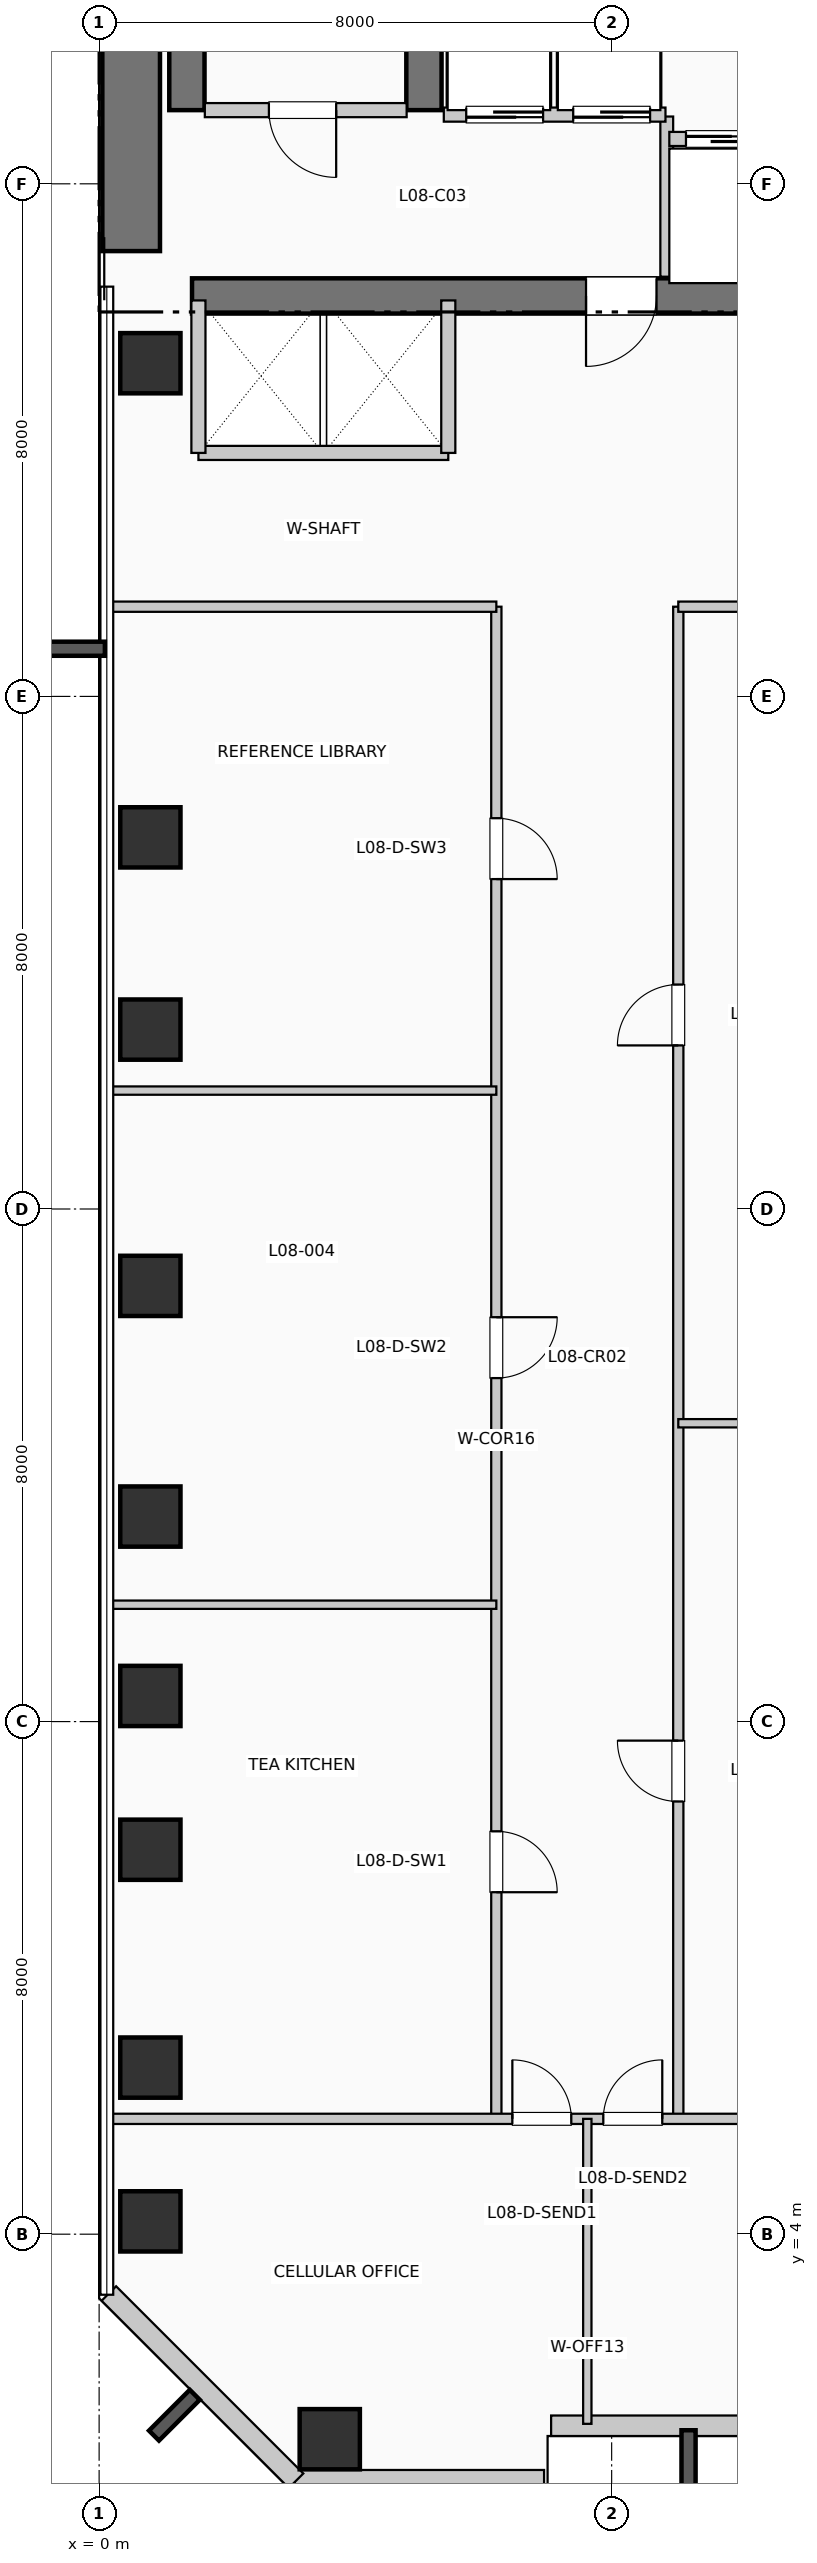
"""IFC4 building model, lengths in metres.
Left out: names, types, materials, properties, quantities, classifications, styles, units other than length and angle.
Written with IfcOpenShell. Run it as: python <this file> out.ifc"""

import sys

from ifc_helpers import new_model, si_unit, direction, frame, frame_2d, origin, origin_2d, place, context, subcontext, project, spatial, rectangle, extrude, element, fill, save


model = new_model("IFC4")
c1 = context("Model", 3, precision=1e-05, world=origin(), true_north=direction((0.0, 1.0)))
c2 = subcontext(c1, "Body", "Model", "MODEL_VIEW")
j1 = project(units=[si_unit("LENGTHUNIT", "METRE"), si_unit("PLANEANGLEUNIT", "RADIAN")], contexts=[c1])
p1 = place(None, origin())
s1 = spatial("IfcSite", under=j1, at=p1, CompositionType="ELEMENT")
p2 = place(p1, origin())
s2 = spatial("IfcBuilding", under=s1, at=p2, CompositionType="ELEMENT")
p3 = place(p2, frame((0.0, 0.0, 38.28)))
s3 = spatial("IfcBuildingStorey", under=s2, at=p3, CompositionType="ELEMENT", Elevation=38.28)
p4 = place(p3, frame((0.5, 34.95, 0.0), z_axis=(0.0, 0.0, 1.0), x_axis=(0.0, 1.0, 0.0)))
e1 = element("IfcWall", 1, at=p4, inside=s3, PredefinedType="SHEAR", context=c2, shape_type="SweptSolid", body=[
    extrude(rectangle(XDim=7.9, YDim=0.9, at=frame_2d((3.95, 0.0))), origin(), (0.0, 0.0, 1.0), 3.96),
])
p5 = place(p3, frame((1.45, 34.25, 0.0), z_axis=(0.0, 0.0, 1.0), x_axis=(1.0, 0.0, 0.0)))
e2 = element("IfcWall", 2, at=p5, inside=s3, PredefinedType="SHEAR", context=c2, shape_type="SweptSolid", body=[
    extrude(rectangle(XDim=10.71, YDim=0.55, at=frame_2d((5.355, 0.0))), origin(), (0.0, 0.0, 1.0), 3.96),
])
p6 = place(p5, frame((7.25, 0.0, 0.0), z_axis=(0.0, 0.0, 1.0), x_axis=(-1.0, 0.0, 0.0)))
e3 = element("IfcOpeningElement", 3, at=p6, cuts=e2, PredefinedType="OPENING", context=c2, shape_type="SweptSolid", body=[
    extrude(rectangle(XDim=1.1, YDim=2.15, at=frame_2d((0.55, 1.075))), frame((0.0, 0.285, 0.0), z_axis=(0.0, -1.0, 0.0), x_axis=(1.0, 0.0, 0.0)), (0.0, 0.0, 1.0), 0.57),
])
for number, where, z_axis, x_axis in (
    (4, (1.37, 37.15, 0.0), (0.0, 0.0, 1.0), (0.0, 1.0, 0.0)),
    (5, (5.07, 37.15, 0.0), (0.0, 0.0, 1.0), (0.0, 1.0, 0.0)),
):
    element("IfcWall", number, at=place(p3, frame(where, z_axis=z_axis, x_axis=x_axis)), inside=s3, PredefinedType="SHEAR", context=c2, shape_type="SweptSolid", body=[
        extrude(rectangle(XDim=7.89, YDim=0.55, at=frame_2d((3.945, 0.0))), origin(), (0.0, 0.0, 1.0), 3.96),
    ])
for number, where, z_axis, x_axis in (
    (6, (0.8, 4.2, 0.0), (0.0, 0.0, 1.0), (1.0, 0.0, 0.0)),
    (7, (0.8, 6.6, 0.0), (0.0, 0.0, 1.0), (1.0, 0.0, 0.0)),
    (8, (0.8, 10.0, 0.0), (0.0, 0.0, 1.0), (1.0, 0.0, 0.0)),
    (9, (0.8, 12.4, 0.0), (0.0, 0.0, 1.0), (1.0, 0.0, 0.0)),
    (10, (0.8, 15.2, 0.0), (0.0, 0.0, 1.0), (1.0, 0.0, 0.0)),
    (11, (0.8, 18.8, 0.0), (0.0, 0.0, 1.0), (1.0, 0.0, 0.0)),
    (12, (0.8, 22.8, 0.0), (0.0, 0.0, 1.0), (1.0, 0.0, 0.0)),
    (13, (0.8, 25.8, 0.0), (0.0, 0.0, 1.0), (1.0, 0.0, 0.0)),
    (14, (0.8, 33.2, 0.0), (0.0, 0.0, 1.0), (1.0, 0.0, 0.0)),
    (15, (3.6, 0.8, 0.0), (0.0, 0.0, 1.0), (1.0, 0.0, 0.0)),
):
    element("IfcColumn", number, at=place(p3, frame(where, z_axis=z_axis, x_axis=x_axis)), inside=s3, PredefinedType="COLUMN", context=c2, shape_type="SweptSolid", body=[
        extrude(rectangle(XDim=0.94, YDim=0.94, at=origin_2d()), origin(), (0.0, 0.0, 1.0), 3.96),
    ])
p7 = place(p3, frame((3.055, 0.16, 0.0), z_axis=(0.0, 0.0, 1.0), x_axis=(1.0, 0.0, 0.0)))
e16 = element("IfcWall", 16, at=p7, inside=s3, PredefinedType="SOLIDWALL", context=c2, shape_type="SweptSolid", body=[
    extrude(rectangle(XDim=3.89, YDim=0.32, at=frame_2d((1.945, 0.0))), origin(), (0.0, 0.0, 1.0), 3.71),
])
p8 = place(p3, frame((7.055, 1.01, 0.0), z_axis=(0.0, 0.0, 1.0), x_axis=(1.0, 0.0, 0.0)))
e17 = element("IfcWall", 17, at=p8, inside=s3, PredefinedType="SOLIDWALL", context=c2, shape_type="SweptSolid", body=[
    extrude(rectangle(XDim=9.89, YDim=0.32, at=frame_2d((4.945, 0.0))), origin(), (0.0, 0.0, 1.0), 3.71),
])
p9 = place(p8, frame((3.745, 0.0, 0.85)))
e18 = element("IfcOpeningElement", 18, at=p9, cuts=e17, PredefinedType="OPENING", context=c2, shape_type="SweptSolid", body=[
    extrude(rectangle(XDim=2.4, YDim=2.05, at=frame_2d((1.2, 1.025))), frame((0.0, 0.17, 0.0), z_axis=(0.0, -1.0, 0.0), x_axis=(1.0, 0.0, 0.0)), (0.0, 0.0, 1.0), 0.34),
])
p10 = place(p3, frame((0.152, 3.074, 0.0), z_axis=(0.0, 0.0, 1.0), x_axis=(0.707106781187, -0.707106781187, 0.0)))
e19 = element("IfcWall", 19, at=p10, inside=s3, PredefinedType="SOLIDWALL", context=c2, shape_type="SweptSolid", body=[
    extrude(rectangle(XDim=4.133, YDim=0.32, at=frame_2d((2.066, 0.0))), origin(), (0.0, 0.0, 1.0), 3.71),
])
p11 = place(p3, frame((1.65, 37.15, 0.0), z_axis=(0.0, 0.0, 1.0), x_axis=(1.0, 0.0, 0.0)))
e20 = element("IfcWall", 20, at=p11, inside=s3, PredefinedType="PARTITIONING", context=c2, shape_type="SweptSolid", body=[
    extrude(rectangle(XDim=3.15, YDim=0.22, at=frame_2d((1.575, 0.0))), origin(), (0.0, 0.0, 1.0), 3.71),
])
p12 = place(p11, frame((2.05, 0.0, 0.0), z_axis=(0.0, 0.0, 1.0), x_axis=(-1.0, 0.0, 0.0)))
e21 = element("IfcOpeningElement", 21, at=p12, cuts=e20, PredefinedType="OPENING", context=c2, shape_type="SweptSolid", body=[
    extrude(rectangle(XDim=1.05, YDim=2.15, at=frame_2d((0.525, 1.075))), frame((0.0, 0.12, 0.0), z_axis=(0.0, -1.0, 0.0), x_axis=(1.0, 0.0, 0.0)), (0.0, 0.0, 1.0), 0.24),
])
p13 = place(p3, frame((8.86, 34.55, 0.0), z_axis=(0.0, 0.0, 1.0), x_axis=(0.0, 1.0, 0.0)))
e22 = element("IfcWall", 22, at=p13, inside=s3, PredefinedType="PARTITIONING", context=c2, shape_type="SweptSolid", body=[
    extrude(rectangle(XDim=2.5, YDim=0.2, at=frame_2d((1.25, 0.0))), origin(), (0.0, 0.0, 1.0), 3.71),
])
p14 = place(p3, frame((5.38, 37.08, 0.0), z_axis=(0.0, 0.0, 1.0), x_axis=(1.0, 0.0, 0.0)))
e23 = element("IfcWall", 23, at=p14, inside=s3, PredefinedType="PARTITIONING", context=c2, shape_type="SweptSolid", body=[
    extrude(rectangle(XDim=3.46, YDim=0.22, at=frame_2d((1.73, 0.0))), origin(), (0.0, 0.0, 1.0), 3.71),
])
p15 = place(p14, frame((1.55, 0.0, 0.0), z_axis=(0.0, 0.0, 1.0), x_axis=(-1.0, 0.0, 0.0)))
e24 = element("IfcOpeningElement", 24, at=p15, cuts=e23, PredefinedType="OPENING", context=c2, shape_type="SweptSolid", body=[
    extrude(rectangle(XDim=1.2, YDim=2.2, at=frame_2d((0.6, 1.1))), frame((0.0, 0.12, 0.0), z_axis=(0.0, -1.0, 0.0), x_axis=(1.0, 0.0, 0.0)), (0.0, 0.0, 1.0), 0.24),
])
p16 = place(p14, frame((3.22, 0.0, 0.0), z_axis=(0.0, 0.0, 1.0), x_axis=(-1.0, 0.0, 0.0)))
e25 = element("IfcOpeningElement", 25, at=p16, cuts=e23, PredefinedType="OPENING", context=c2, shape_type="SweptSolid", body=[
    extrude(rectangle(XDim=1.2, YDim=2.2, at=frame_2d((0.6, 1.1))), frame((0.0, 0.12, 0.0), z_axis=(0.0, -1.0, 0.0), x_axis=(1.0, 0.0, 0.0)), (0.0, 0.0, 1.0), 0.24),
])
p17 = place(p3, frame((1.55, 31.8, 0.0), z_axis=(0.0, 0.0, 1.0), x_axis=(1.0, 0.0, 0.0)))
e26 = element("IfcWall", 26, at=p17, inside=s3, PredefinedType="PARTITIONING", context=c2, shape_type="SweptSolid", body=[
    extrude(rectangle(XDim=3.9, YDim=0.22, at=frame_2d((1.95, 0.0))), origin(), (0.0, 0.0, 1.0), 3.71),
])
for number, where, z_axis, x_axis in (
    (27, (1.55, 31.8, 0.0), (0.0, 0.0, 1.0), (0.0, 1.0, 0.0)),
    (28, (5.45, 31.8, 0.0), (0.0, 0.0, 1.0), (0.0, 1.0, 0.0)),
):
    element("IfcWall", number, at=place(p3, frame(where, z_axis=z_axis, x_axis=x_axis)), inside=s3, PredefinedType="PARTITIONING", context=c2, shape_type="SweptSolid", body=[
        extrude(rectangle(XDim=2.38, YDim=0.22, at=frame_2d((1.19, 0.0))), origin(), (0.0, 0.0, 1.0), 3.71),
    ])
p18 = place(p3, frame((8.9, 36.7, 0.0), z_axis=(0.0, 0.0, 1.0), x_axis=(1.0, 0.0, 0.0)))
e29 = element("IfcWall", 29, at=p18, inside=s3, PredefinedType="PARTITIONING", context=c2, shape_type="SweptSolid", body=[
    extrude(rectangle(XDim=3.26, YDim=0.22, at=frame_2d((1.63, 0.0))), origin(), (0.0, 0.0, 1.0), 3.71),
])
p19 = place(p18, frame((0.26, 0.0, 0.0)))
e30 = element("IfcOpeningElement", 30, at=p19, cuts=e29, PredefinedType="OPENING", context=c2, shape_type="SweptSolid", body=[
    extrude(rectangle(XDim=1.1, YDim=2.2, at=frame_2d((0.55, 1.1))), frame((0.0, 0.12, 0.0), z_axis=(0.0, -1.0, 0.0), x_axis=(1.0, 0.0, 0.0)), (0.0, 0.0, 1.0), 0.24),
])
p20 = place(p18, frame((1.88, 0.0, 0.0)))
e31 = element("IfcOpeningElement", 31, at=p20, cuts=e29, PredefinedType="OPENING", context=c2, shape_type="SweptSolid", body=[
    extrude(rectangle(XDim=1.1, YDim=2.2, at=frame_2d((0.55, 1.1))), frame((0.0, 0.12, 0.0), z_axis=(0.0, -1.0, 0.0), x_axis=(1.0, 0.0, 0.0)), (0.0, 0.0, 1.0), 0.24),
])
p21 = place(p3, frame((6.2, 5.8, 0.0), z_axis=(0.0, 0.0, 1.0), x_axis=(0.0, 1.0, 0.0)))
e32 = element("IfcWall", 32, at=p21, inside=s3, PredefinedType="PARTITIONING", context=c2, shape_type="SweptSolid", body=[
    extrude(rectangle(XDim=23.6, YDim=0.16, at=frame_2d((11.8, 0.0))), origin(), (0.0, 0.0, 1.0), 3.71),
])
p22 = place(p21, frame((4.487, 0.0, 0.0), z_axis=(0.0, 0.0, 1.0), x_axis=(-1.0, 0.0, 0.0)))
e33 = element("IfcOpeningElement", 33, at=p22, cuts=e32, PredefinedType="OPENING", context=c2, shape_type="SweptSolid", body=[
    extrude(rectangle(XDim=0.95, YDim=2.15, at=frame_2d((0.475, 1.075))), frame((0.0, 0.09, 0.0), z_axis=(0.0, -1.0, 0.0), x_axis=(1.0, 0.0, 0.0)), (0.0, 0.0, 1.0), 0.18),
])
p23 = place(p21, frame((12.511, 0.0, 0.0), z_axis=(0.0, 0.0, 1.0), x_axis=(-1.0, 0.0, 0.0)))
e34 = element("IfcOpeningElement", 34, at=p23, cuts=e32, PredefinedType="OPENING", context=c2, shape_type="SweptSolid", body=[
    extrude(rectangle(XDim=0.95, YDim=2.15, at=frame_2d((0.475, 1.075))), frame((0.0, 0.09, 0.0), z_axis=(0.0, -1.0, 0.0), x_axis=(1.0, 0.0, 0.0)), (0.0, 0.0, 1.0), 0.18),
])
p24 = place(p21, frame((20.299, 0.0, 0.0), z_axis=(0.0, 0.0, 1.0), x_axis=(-1.0, 0.0, 0.0)))
e35 = element("IfcOpeningElement", 35, at=p24, cuts=e32, PredefinedType="OPENING", context=c2, shape_type="SweptSolid", body=[
    extrude(rectangle(XDim=0.95, YDim=2.15, at=frame_2d((0.475, 1.075))), frame((0.0, 0.09, 0.0), z_axis=(0.0, -1.0, 0.0), x_axis=(1.0, 0.0, 0.0)), (0.0, 0.0, 1.0), 0.18),
])
p25 = place(p3, frame((9.04, 5.8, 0.0), z_axis=(0.0, 0.0, 1.0), x_axis=(0.0, 1.0, 0.0)))
e36 = element("IfcWall", 36, at=p25, inside=s3, PredefinedType="PARTITIONING", context=c2, shape_type="SweptSolid", body=[
    extrude(rectangle(XDim=23.6, YDim=0.16, at=frame_2d((11.8, 0.0))), origin(), (0.0, 0.0, 1.0), 3.71),
])
p26 = place(p25, frame((4.953, 0.0, 0.0)))
e37 = element("IfcOpeningElement", 37, at=p26, cuts=e36, PredefinedType="OPENING", context=c2, shape_type="SweptSolid", body=[
    extrude(rectangle(XDim=0.95, YDim=2.15, at=frame_2d((0.475, 1.075))), frame((0.0, 0.09, 0.0), z_axis=(0.0, -1.0, 0.0), x_axis=(1.0, 0.0, 0.0)), (0.0, 0.0, 1.0), 0.18),
])
p27 = place(p25, frame((16.753, 0.0, 0.0)))
e38 = element("IfcOpeningElement", 38, at=p27, cuts=e36, PredefinedType="OPENING", context=c2, shape_type="SweptSolid", body=[
    extrude(rectangle(XDim=0.95, YDim=2.15, at=frame_2d((0.475, 1.075))), frame((0.0, 0.09, 0.0), z_axis=(0.0, -1.0, 0.0), x_axis=(1.0, 0.0, 0.0)), (0.0, 0.0, 1.0), 0.18),
])
p28 = place(p3, frame((0.19, 5.8, 0.0), z_axis=(0.0, 0.0, 1.0), x_axis=(1.0, 0.0, 0.0)))
e39 = element("IfcWall", 39, at=p28, inside=s3, PredefinedType="PARTITIONING", context=c2, shape_type="SweptSolid", body=[
    extrude(rectangle(XDim=23.26, YDim=0.16, at=frame_2d((11.63, 0.0))), origin(), (0.0, 0.0, 1.0), 3.71),
])
p29 = place(p28, frame((6.26, 0.0, 0.0)))
e40 = element("IfcOpeningElement", 40, at=p29, cuts=e39, PredefinedType="OPENING", context=c2, shape_type="SweptSolid", body=[
    extrude(rectangle(XDim=0.92, YDim=2.1, at=frame_2d((0.46, 1.05))), frame((0.0, 0.09, 0.0), z_axis=(0.0, -1.0, 0.0), x_axis=(1.0, 0.0, 0.0)), (0.0, 0.0, 1.0), 0.18),
])
p30 = place(p28, frame((7.68, 0.0, 0.0)))
e41 = element("IfcOpeningElement", 41, at=p30, cuts=e39, PredefinedType="OPENING", context=c2, shape_type="SweptSolid", body=[
    extrude(rectangle(XDim=0.92, YDim=2.1, at=frame_2d((0.46, 1.05))), frame((0.0, 0.09, 0.0), z_axis=(0.0, -1.0, 0.0), x_axis=(1.0, 0.0, 0.0)), (0.0, 0.0, 1.0), 0.18),
])
p31 = place(p3, frame((0.19, 29.4, 0.0), z_axis=(0.0, 0.0, 1.0), x_axis=(1.0, 0.0, 0.0)))
e42 = element("IfcWall", 42, at=p31, inside=s3, PredefinedType="PARTITIONING", context=c2, shape_type="SweptSolid", body=[
    extrude(rectangle(XDim=6.01, YDim=0.16, at=frame_2d((3.005, 0.0))), origin(), (0.0, 0.0, 1.0), 3.365),
])
p32 = place(p3, frame((9.04, 29.4, 0.0), z_axis=(0.0, 0.0, 1.0), x_axis=(1.0, 0.0, 0.0)))
e43 = element("IfcWall", 43, at=p32, inside=s3, PredefinedType="PARTITIONING", context=c2, shape_type="SweptSolid", body=[
    extrude(rectangle(XDim=14.41, YDim=0.16, at=frame_2d((7.205, 0.0))), origin(), (0.0, 0.0, 1.0), 3.365),
])
p33 = place(p3, frame((7.62, 1.04, 0.0), z_axis=(0.0, 0.0, 1.0), x_axis=(0.0, 1.0, 0.0)))
e44 = element("IfcWall", 44, at=p33, inside=s3, PredefinedType="PARTITIONING", context=c2, shape_type="SweptSolid", body=[
    extrude(rectangle(XDim=4.76, YDim=0.13, at=frame_2d((2.38, 0.0))), origin(), (0.0, 0.0, 1.0), 3.71),
])
for number, where, z_axis, x_axis in (
    (45, (0.19, 13.824, 0.0), (0.0, 0.0, 1.0), (1.0, 0.0, 0.0)),
    (46, (0.19, 21.848, 0.0), (0.0, 0.0, 1.0), (1.0, 0.0, 0.0)),
):
    element("IfcWall", number, at=place(p3, frame(where, z_axis=z_axis, x_axis=x_axis)), inside=s3, PredefinedType="PARTITIONING", context=c2, shape_type="SweptSolid", body=[
        extrude(rectangle(XDim=6.01, YDim=0.13, at=frame_2d((3.005, 0.0))), origin(), (0.0, 0.0, 1.0), 3.71),
    ])
p34 = place(p3, frame((9.04, 16.656, 0.0), z_axis=(0.0, 0.0, 1.0), x_axis=(1.0, 0.0, 0.0)))
e47 = element("IfcWall", 47, at=p34, inside=s3, PredefinedType="PARTITIONING", context=c2, shape_type="SweptSolid", body=[
    extrude(rectangle(XDim=14.41, YDim=0.13, at=frame_2d((7.205, 0.0))), origin(), (0.0, 0.0, 1.0), 3.71),
])
p35 = place(p12, origin())
e48 = element("IfcDoor", 48, at=p35, inside=s3, OperationType="SINGLE_SWING_RIGHT", PredefinedType="DOOR", context=c2, shape_type="SweptSolid", body=[
    extrude(rectangle(XDim=1.05, YDim=2.15, at=frame_2d((0.525, 1.075))), frame((0.0, 0.025, 0.0), z_axis=(0.0, -1.0, 0.0), x_axis=(1.0, 0.0, 0.0)), (0.0, 0.0, 1.0), 0.05),
])
fill(e21, e48)
p36 = place(p6, origin())
e49 = element("IfcDoor", 49, at=p36, inside=s3, OperationType="SINGLE_SWING_LEFT", PredefinedType="DOOR", context=c2, shape_type="SweptSolid", body=[
    extrude(rectangle(XDim=1.1, YDim=2.15, at=frame_2d((0.55, 1.075))), frame((0.0, 0.025, 0.0), z_axis=(0.0, -1.0, 0.0), x_axis=(1.0, 0.0, 0.0)), (0.0, 0.0, 1.0), 0.05),
])
fill(e3, e49)
p37 = place(p15, origin())
e50 = element("IfcDoor", 50, at=p37, inside=s3, OperationType="SLIDING_TO_RIGHT", PredefinedType="DOOR", context=c2, shape_type="SweptSolid", body=[
    extrude(rectangle(XDim=1.2, YDim=2.2, at=frame_2d((0.6, 1.1))), frame((0.0, 0.025, 0.0), z_axis=(0.0, -1.0, 0.0), x_axis=(1.0, 0.0, 0.0)), (0.0, 0.0, 1.0), 0.05),
])
fill(e24, e50)
p38 = place(p16, origin())
e51 = element("IfcDoor", 51, at=p38, inside=s3, OperationType="SLIDING_TO_RIGHT", PredefinedType="DOOR", context=c2, shape_type="SweptSolid", body=[
    extrude(rectangle(XDim=1.2, YDim=2.2, at=frame_2d((0.6, 1.1))), frame((0.0, 0.025, 0.0), z_axis=(0.0, -1.0, 0.0), x_axis=(1.0, 0.0, 0.0)), (0.0, 0.0, 1.0), 0.05),
])
fill(e25, e51)
p39 = place(p19, origin())
e52 = element("IfcDoor", 52, at=p39, inside=s3, OperationType="SLIDING_TO_LEFT", PredefinedType="DOOR", context=c2, shape_type="SweptSolid", body=[
    extrude(rectangle(XDim=1.1, YDim=2.2, at=frame_2d((0.55, 1.1))), frame((0.0, 0.025, 0.0), z_axis=(0.0, -1.0, 0.0), x_axis=(1.0, 0.0, 0.0)), (0.0, 0.0, 1.0), 0.05),
])
fill(e30, e52)
p40 = place(p29, origin())
e53 = element("IfcDoor", 53, at=p40, inside=s3, OperationType="SINGLE_SWING_LEFT", PredefinedType="DOOR", context=c2, shape_type="SweptSolid", body=[
    extrude(rectangle(XDim=0.92, YDim=2.1, at=frame_2d((0.46, 1.05))), frame((0.0, 0.025, 0.0), z_axis=(0.0, -1.0, 0.0), x_axis=(1.0, 0.0, 0.0)), (0.0, 0.0, 1.0), 0.05),
])
fill(e40, e53)
p41 = place(p30, origin())
e54 = element("IfcDoor", 54, at=p41, inside=s3, OperationType="SINGLE_SWING_RIGHT", PredefinedType="DOOR", context=c2, shape_type="SweptSolid", body=[
    extrude(rectangle(XDim=0.92, YDim=2.1, at=frame_2d((0.46, 1.05))), frame((0.0, 0.025, 0.0), z_axis=(0.0, -1.0, 0.0), x_axis=(1.0, 0.0, 0.0)), (0.0, 0.0, 1.0), 0.05),
])
fill(e41, e54)
p42 = place(p22, origin())
e55 = element("IfcDoor", 55, at=p42, inside=s3, OperationType="SINGLE_SWING_LEFT", PredefinedType="DOOR", context=c2, shape_type="SweptSolid", body=[
    extrude(rectangle(XDim=0.95, YDim=2.15, at=frame_2d((0.475, 1.075))), frame((0.0, 0.025, 0.0), z_axis=(0.0, -1.0, 0.0), x_axis=(1.0, 0.0, 0.0)), (0.0, 0.0, 1.0), 0.05),
])
fill(e33, e55)
p43 = place(p23, origin())
e56 = element("IfcDoor", 56, at=p43, inside=s3, OperationType="SINGLE_SWING_RIGHT", PredefinedType="DOOR", context=c2, shape_type="SweptSolid", body=[
    extrude(rectangle(XDim=0.95, YDim=2.15, at=frame_2d((0.475, 1.075))), frame((0.0, 0.025, 0.0), z_axis=(0.0, -1.0, 0.0), x_axis=(1.0, 0.0, 0.0)), (0.0, 0.0, 1.0), 0.05),
])
fill(e34, e56)
p44 = place(p24, origin())
e57 = element("IfcDoor", 57, at=p44, inside=s3, OperationType="SINGLE_SWING_LEFT", PredefinedType="DOOR", context=c2, shape_type="SweptSolid", body=[
    extrude(rectangle(XDim=0.95, YDim=2.15, at=frame_2d((0.475, 1.075))), frame((0.0, 0.025, 0.0), z_axis=(0.0, -1.0, 0.0), x_axis=(1.0, 0.0, 0.0)), (0.0, 0.0, 1.0), 0.05),
])
fill(e35, e57)
p45 = place(p26, origin())
e58 = element("IfcDoor", 58, at=p45, inside=s3, OperationType="SINGLE_SWING_RIGHT", PredefinedType="DOOR", context=c2, shape_type="SweptSolid", body=[
    extrude(rectangle(XDim=0.95, YDim=2.15, at=frame_2d((0.475, 1.075))), frame((0.0, 0.025, 0.0), z_axis=(0.0, -1.0, 0.0), x_axis=(1.0, 0.0, 0.0)), (0.0, 0.0, 1.0), 0.05),
])
fill(e37, e58)
p46 = place(p27, origin())
e59 = element("IfcDoor", 59, at=p46, inside=s3, OperationType="SINGLE_SWING_LEFT", PredefinedType="DOOR", context=c2, shape_type="SweptSolid", body=[
    extrude(rectangle(XDim=0.95, YDim=2.15, at=frame_2d((0.475, 1.075))), frame((0.0, 0.025, 0.0), z_axis=(0.0, -1.0, 0.0), x_axis=(1.0, 0.0, 0.0)), (0.0, 0.0, 1.0), 0.05),
])
fill(e38, e59)
save(model, sys.argv[1])
